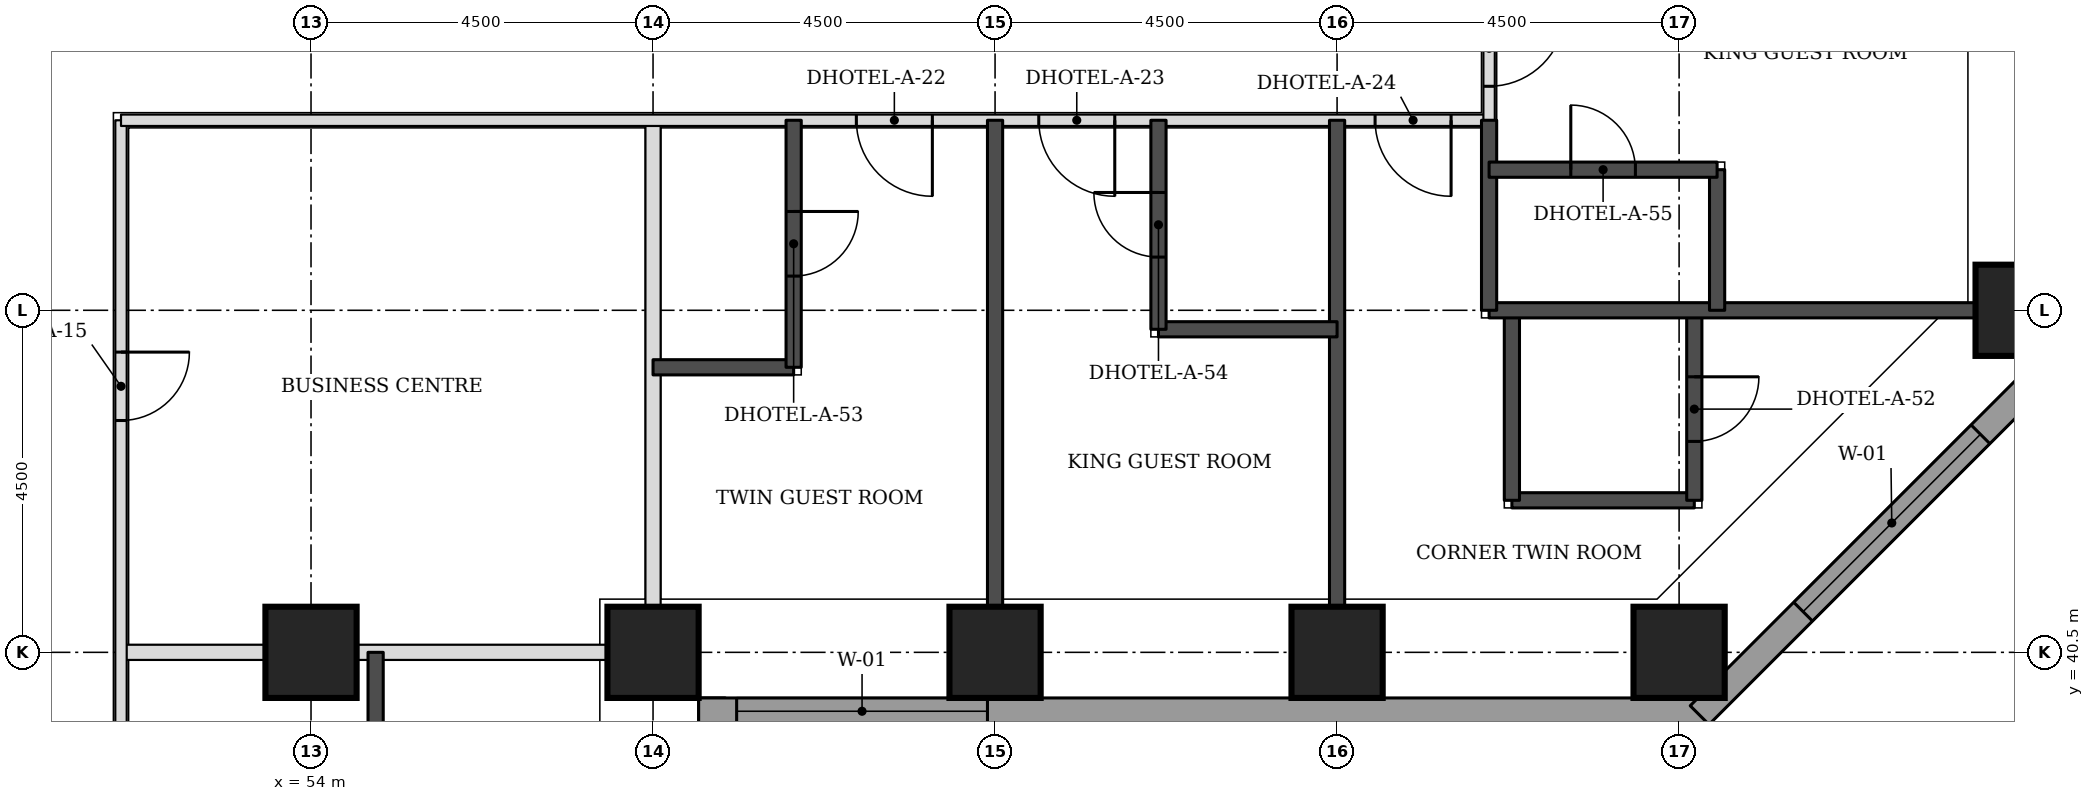
"""IFC4 building model, lengths in metres.
Left out: names, types, materials, properties, quantities, classifications, styles, units other than length and angle.
Written with IfcOpenShell. Run it as: python <this file> out.ifc"""

import sys

from ifc_helpers import new_model, si_unit, direction, frame, frame_2d, origin, origin_2d, place, context, subcontext, project, spatial, rectangle, extrude, element, fill, save


model = new_model("IFC4")
c1 = context("Model", 3, precision=1e-05, world=origin(), true_north=direction((0.0, 1.0)))
c2 = subcontext(c1, "Body", "Model", "MODEL_VIEW")
j1 = project(units=[si_unit("LENGTHUNIT", "METRE"), si_unit("PLANEANGLEUNIT", "RADIAN")], contexts=[c1])
p1 = place(None, origin())
s1 = spatial("IfcSite", under=j1, at=p1, CompositionType="ELEMENT")
p2 = place(p1, origin())
s2 = spatial("IfcBuilding", under=s1, at=p2, CompositionType="ELEMENT")
p3 = place(p2, frame((0.0, 0.0, 49.5)))
s3 = spatial("IfcBuildingStorey", under=s2, at=p3, CompositionType="ELEMENT", Elevation=49.5)
for number, where, z_axis, x_axis in (
    (1, (54.0, 40.5, 0.0), (0.0, 0.0, 1.0), (1.0, 0.0, 0.0)),
    (2, (58.5, 40.5, 0.0), (0.0, 0.0, 1.0), (1.0, 0.0, 0.0)),
    (3, (63.0, 40.5, 0.0), (0.0, 0.0, 1.0), (1.0, 0.0, 0.0)),
    (4, (67.5, 40.5, 0.0), (0.0, 0.0, 1.0), (1.0, 0.0, 0.0)),
    (5, (72.0, 40.5, 0.0), (0.0, 0.0, 1.0), (1.0, 0.0, 0.0)),
    (6, (76.5, 45.0, 0.0), (0.0, 0.0, 1.0), (1.0, 0.0, 0.0)),
):
    element("IfcColumn", number, at=place(p3, frame(where, z_axis=z_axis, x_axis=x_axis)), inside=s3, PredefinedType="COLUMN", context=c2, shape_type="SweptSolid", body=[
        extrude(rectangle(XDim=1.2, YDim=1.2, at=origin_2d()), origin(), (0.0, 0.0, 1.0), 3.3),
    ])
p4 = place(p3, frame((59.275, 22.106, 0.0), z_axis=(0.0, 0.0, 1.0), x_axis=(0.0, 1.0, 0.0)))
e7 = element("IfcWall", 7, at=p4, inside=s3, PredefinedType="STANDARD", context=c2, shape_type="SweptSolid", body=[
    extrude(rectangle(XDim=17.793, YDim=0.35, at=frame_2d((8.897, 0.0))), origin(), (0.0, 0.0, 1.0), 3.055),
])
p5 = place(p4, frame((5.493, 0.0, 0.8)))
e8 = element("IfcOpeningElement", 8, at=p5, cuts=e7, PredefinedType="OPENING", context=c2, shape_type="SweptSolid", body=[
    extrude(rectangle(XDim=3.3, YDim=1.5, at=frame_2d((1.65, 0.75))), frame((0.0, 0.185, 0.0), z_axis=(0.0, -1.0, 0.0), x_axis=(1.0, 0.0, 0.0)), (0.0, 0.0, 1.0), 0.37),
])
p6 = place(p4, frame((13.993, 0.0, 0.8)))
e9 = element("IfcOpeningElement", 9, at=p6, cuts=e7, PredefinedType="OPENING", context=c2, shape_type="SweptSolid", body=[
    extrude(rectangle(XDim=3.3, YDim=1.5, at=frame_2d((1.65, 0.75))), frame((0.0, 0.185, 0.0), z_axis=(0.0, -1.0, 0.0), x_axis=(1.0, 0.0, 0.0)), (0.0, 0.0, 1.0), 0.37),
])
p7 = place(p3, frame((59.1, 39.725, 0.0), z_axis=(0.0, 0.0, 1.0), x_axis=(1.0, 0.0, 0.0)))
e10 = element("IfcWall", 10, at=p7, inside=s3, PredefinedType="STANDARD", context=c2, shape_type="SweptSolid", body=[
    extrude(rectangle(XDim=13.293, YDim=0.35, at=frame_2d((6.647, 0.0))), origin(), (0.0, 0.0, 1.0), 3.055),
])
p8 = place(p7, frame((0.5, 0.0, 0.8)))
e11 = element("IfcOpeningElement", 11, at=p8, cuts=e10, PredefinedType="OPENING", context=c2, shape_type="SweptSolid", body=[
    extrude(rectangle(XDim=3.3, YDim=1.5, at=frame_2d((1.65, 0.75))), frame((0.0, 0.185, 0.0), z_axis=(0.0, -1.0, 0.0), x_axis=(1.0, 0.0, 0.0)), (0.0, 0.0, 1.0), 0.37),
])
p9 = place(p3, frame((72.27, 39.674, 0.0), z_axis=(0.0, 0.0, 1.0), x_axis=(0.707106781187, 0.707106781187, 0.0)))
e12 = element("IfcWall", 12, at=p9, inside=s3, PredefinedType="STANDARD", context=c2, shape_type="SweptSolid", body=[
    extrude(rectangle(XDim=7.151, YDim=0.35, at=frame_2d((3.576, 0.0))), origin(), (0.0, 0.0, 1.0), 3.055),
])
p10 = place(p9, frame((1.926, 0.0, 0.8)))
e13 = element("IfcOpeningElement", 13, at=p10, cuts=e12, PredefinedType="OPENING", context=c2, shape_type="SweptSolid", body=[
    extrude(rectangle(XDim=3.3, YDim=1.5, at=frame_2d((1.65, 0.75))), frame((0.0, 0.185, 0.0), z_axis=(0.0, -1.0, 0.0), x_axis=(1.0, 0.0, 0.0)), (0.0, 0.0, 1.0), 0.37),
])
p11 = place(p3, frame((51.5, 40.5, 0.0), z_axis=(0.0, 0.0, 1.0), x_axis=(1.0, 0.0, 0.0)))
e14 = element("IfcWall", 14, at=p11, inside=s3, PredefinedType="PARTITIONING", context=c2, shape_type="SweptSolid", body=[
    extrude(rectangle(XDim=6.4, YDim=0.2, at=frame_2d((3.2, 0.0))), origin(), (0.0, 0.0, 1.0), 2.33),
])
p12 = place(p3, frame((58.5, 41.1, 0.0), z_axis=(0.0, 0.0, 1.0), x_axis=(0.0, 1.0, 0.0)))
e15 = element("IfcWall", 15, at=p12, inside=s3, PredefinedType="PARTITIONING", context=c2, shape_type="SweptSolid", body=[
    extrude(rectangle(XDim=6.4, YDim=0.2, at=frame_2d((3.2, 0.0))), origin(), (0.0, 0.0, 1.0), 3.08),
])
p13 = place(p3, frame((51.5, 23.65, 0.0), z_axis=(0.0, 0.0, 1.0), x_axis=(0.0, 1.0, 0.0)))
e16 = element("IfcWall", 16, at=p13, inside=s3, PredefinedType="PARTITIONING", context=c2, shape_type="SweptSolid", body=[
    extrude(rectangle(XDim=23.85, YDim=0.15, at=frame_2d((11.925, 0.0))), origin(), (0.0, 0.0, 1.0), 3.08),
])
p14 = place(p13, frame((4.075, 0.0, 0.0)))
e17 = element("IfcOpeningElement", 17, at=p14, cuts=e16, PredefinedType="OPENING", context=c2, shape_type="SweptSolid", body=[
    extrude(rectangle(XDim=1.0, YDim=2.1, at=frame_2d((0.5, 1.05))), frame((0.0, 0.085, 0.0), z_axis=(0.0, -1.0, 0.0), x_axis=(1.0, 0.0, 0.0)), (0.0, 0.0, 1.0), 0.17),
])
p15 = place(p13, frame((10.375, 0.0, 0.0)))
e18 = element("IfcOpeningElement", 18, at=p15, cuts=e16, PredefinedType="OPENING", context=c2, shape_type="SweptSolid", body=[
    extrude(rectangle(XDim=1.0, YDim=2.1, at=frame_2d((0.5, 1.05))), frame((0.0, 0.085, 0.0), z_axis=(0.0, -1.0, 0.0), x_axis=(1.0, 0.0, 0.0)), (0.0, 0.0, 1.0), 0.17),
])
p16 = place(p13, frame((19.9, 0.0, 0.0)))
e19 = element("IfcOpeningElement", 19, at=p16, cuts=e16, PredefinedType="OPENING", context=c2, shape_type="SweptSolid", body=[
    extrude(rectangle(XDim=0.9, YDim=2.1, at=frame_2d((0.45, 1.05))), frame((0.0, 0.085, 0.0), z_axis=(0.0, -1.0, 0.0), x_axis=(1.0, 0.0, 0.0)), (0.0, 0.0, 1.0), 0.17),
])
p17 = place(p3, frame((51.5, 47.5, 0.0), z_axis=(0.0, 0.0, 1.0), x_axis=(1.0, 0.0, 0.0)))
e20 = element("IfcWall", 20, at=p17, inside=s3, PredefinedType="PARTITIONING", context=c2, shape_type="SweptSolid", body=[
    extrude(rectangle(XDim=18.0, YDim=0.15, at=frame_2d((9.0, 0.0))), origin(), (0.0, 0.0, 1.0), 3.08),
])
p18 = place(p17, frame((12.075, 0.0, 0.0)))
e21 = element("IfcOpeningElement", 21, at=p18, cuts=e20, PredefinedType="OPENING", context=c2, shape_type="SweptSolid", body=[
    extrude(rectangle(XDim=1.0, YDim=2.1, at=frame_2d((0.5, 1.05))), frame((0.0, 0.085, 0.0), z_axis=(0.0, -1.0, 0.0), x_axis=(1.0, 0.0, 0.0)), (0.0, 0.0, 1.0), 0.17),
])
p19 = place(p17, frame((9.675, 0.0, 0.0)))
e22 = element("IfcOpeningElement", 22, at=p19, cuts=e20, PredefinedType="OPENING", context=c2, shape_type="SweptSolid", body=[
    extrude(rectangle(XDim=1.0, YDim=2.1, at=frame_2d((0.5, 1.05))), frame((0.0, 0.085, 0.0), z_axis=(0.0, -1.0, 0.0), x_axis=(1.0, 0.0, 0.0)), (0.0, 0.0, 1.0), 0.17),
])
p20 = place(p17, frame((16.5, 0.0, 0.0)))
e23 = element("IfcOpeningElement", 23, at=p20, cuts=e20, PredefinedType="OPENING", context=c2, shape_type="SweptSolid", body=[
    extrude(rectangle(XDim=1.0, YDim=2.1, at=frame_2d((0.5, 1.05))), frame((0.0, 0.085, 0.0), z_axis=(0.0, -1.0, 0.0), x_axis=(1.0, 0.0, 0.0)), (0.0, 0.0, 1.0), 0.17),
])
p21 = place(p3, frame((69.5, 47.5, 0.0), z_axis=(0.0, 0.0, 1.0), x_axis=(0.0, 1.0, 0.0)))
e24 = element("IfcWall", 24, at=p21, inside=s3, PredefinedType="PARTITIONING", context=c2, shape_type="SweptSolid", body=[
    extrude(rectangle(XDim=26.5, YDim=0.15, at=frame_2d((13.25, 0.0))), origin(), (0.0, 0.0, 1.0), 3.08),
])
p22 = place(p21, frame((22.525, 0.0, 0.0)))
e25 = element("IfcOpeningElement", 25, at=p22, cuts=e24, PredefinedType="OPENING", context=c2, shape_type="SweptSolid", body=[
    extrude(rectangle(XDim=1.0, YDim=2.1, at=frame_2d((0.5, 1.05))), frame((0.0, 0.085, 0.0), z_axis=(0.0, -1.0, 0.0), x_axis=(1.0, 0.0, 0.0)), (0.0, 0.0, 1.0), 0.17),
])
p23 = place(p21, frame((16.225, 0.0, 0.0)))
e26 = element("IfcOpeningElement", 26, at=p23, cuts=e24, PredefinedType="OPENING", context=c2, shape_type="SweptSolid", body=[
    extrude(rectangle(XDim=1.0, YDim=2.1, at=frame_2d((0.5, 1.05))), frame((0.0, 0.085, 0.0), z_axis=(0.0, -1.0, 0.0), x_axis=(1.0, 0.0, 0.0)), (0.0, 0.0, 1.0), 0.17),
])
p24 = place(p21, frame((4.25, 0.0, 0.0)))
e27 = element("IfcOpeningElement", 27, at=p24, cuts=e24, PredefinedType="OPENING", context=c2, shape_type="SweptSolid", body=[
    extrude(rectangle(XDim=1.1, YDim=2.1, at=frame_2d((0.55, 1.05))), frame((0.0, 0.085, 0.0), z_axis=(0.0, -1.0, 0.0), x_axis=(1.0, 0.0, 0.0)), (0.0, 0.0, 1.0), 0.17),
])
p25 = place(p21, frame((0.447, 0.0, 0.0)))
e28 = element("IfcOpeningElement", 28, at=p25, cuts=e24, PredefinedType="OPENING", context=c2, shape_type="SweptSolid", body=[
    extrude(rectangle(XDim=1.0, YDim=2.1, at=frame_2d((0.5, 1.05))), frame((0.0, 0.085, 0.0), z_axis=(0.0, -1.0, 0.0), x_axis=(1.0, 0.0, 0.0)), (0.0, 0.0, 1.0), 0.17),
])
p26 = place(p3, frame((54.85, 37.55, 0.0), z_axis=(0.0, 0.0, 1.0), x_axis=(0.0, 1.0, 0.0)))
e29 = element("IfcWall", 29, at=p26, inside=s3, PredefinedType="SOLIDWALL", context=c2, shape_type="SweptSolid", body=[
    extrude(rectangle(XDim=2.95, YDim=0.2, at=frame_2d((1.475, 0.0))), origin(), (0.0, 0.0, 1.0), 3.08),
])
for number, where, z_axis, x_axis in (
    (30, (63.0, 41.1, 0.0), (0.0, 0.0, 1.0), (0.0, 1.0, 0.0)),
    (31, (67.5, 41.1, 0.0), (0.0, 0.0, 1.0), (0.0, 1.0, 0.0)),
):
    element("IfcWall", number, at=place(p3, frame(where, z_axis=z_axis, x_axis=x_axis)), inside=s3, PredefinedType="SOLIDWALL", context=c2, shape_type="SweptSolid", body=[
        extrude(rectangle(XDim=6.4, YDim=0.2, at=frame_2d((3.2, 0.0))), origin(), (0.0, 0.0, 1.0), 3.08),
    ])
p27 = place(p3, frame((69.8, 42.5, 0.0), z_axis=(0.0, 0.0, 1.0), x_axis=(1.0, 0.0, 0.0)))
e32 = element("IfcWall", 32, at=p27, inside=s3, PredefinedType="SOLIDWALL", context=c2, shape_type="SweptSolid", body=[
    extrude(rectangle(XDim=2.4, YDim=0.2, at=frame_2d((1.2, 0.0))), origin(), (0.0, 0.0, 1.0), 3.08),
])
p28 = place(p3, frame((69.8, 42.5, 0.0), z_axis=(0.0, 0.0, 1.0), x_axis=(0.0, 1.0, 0.0)))
e33 = element("IfcWall", 33, at=p28, inside=s3, PredefinedType="SOLIDWALL", context=c2, shape_type="SweptSolid", body=[
    extrude(rectangle(XDim=2.5, YDim=0.2, at=frame_2d((1.25, 0.0))), origin(), (0.0, 0.0, 1.0), 3.08),
])
p29 = place(p3, frame((72.2, 42.5, 0.0), z_axis=(0.0, 0.0, 1.0), x_axis=(0.0, 1.0, 0.0)))
e34 = element("IfcWall", 34, at=p29, inside=s3, PredefinedType="SOLIDWALL", context=c2, shape_type="SweptSolid", body=[
    extrude(rectangle(XDim=2.5, YDim=0.2, at=frame_2d((1.25, 0.0))), origin(), (0.0, 0.0, 1.0), 3.08),
])
p30 = place(p29, frame((0.775, 0.0, 0.0)))
e35 = element("IfcOpeningElement", 35, at=p30, cuts=e34, PredefinedType="OPENING", context=c2, shape_type="SweptSolid", body=[
    extrude(rectangle(XDim=0.85, YDim=2.1, at=frame_2d((0.425, 1.05))), frame((0.0, 0.11, 0.0), z_axis=(0.0, -1.0, 0.0), x_axis=(1.0, 0.0, 0.0)), (0.0, 0.0, 1.0), 0.22),
])
p31 = place(p3, frame((58.5, 44.25, 0.0), z_axis=(0.0, 0.0, 1.0), x_axis=(1.0, 0.0, 0.0)))
e36 = element("IfcWall", 36, at=p31, inside=s3, PredefinedType="SOLIDWALL", context=c2, shape_type="SweptSolid", body=[
    extrude(rectangle(XDim=1.85, YDim=0.2, at=frame_2d((0.925, 0.0))), origin(), (0.0, 0.0, 1.0), 3.08),
])
p32 = place(p3, frame((60.35, 44.25, 0.0), z_axis=(0.0, 0.0, 1.0), x_axis=(0.0, 1.0, 0.0)))
e37 = element("IfcWall", 37, at=p32, inside=s3, PredefinedType="SOLIDWALL", context=c2, shape_type="SweptSolid", body=[
    extrude(rectangle(XDim=3.25, YDim=0.2, at=frame_2d((1.625, 0.0))), origin(), (0.0, 0.0, 1.0), 3.08),
])
p33 = place(p32, frame((1.2, 0.0, 0.0)))
e38 = element("IfcOpeningElement", 38, at=p33, cuts=e37, PredefinedType="OPENING", context=c2, shape_type="SweptSolid", body=[
    extrude(rectangle(XDim=0.85, YDim=2.1, at=frame_2d((0.425, 1.05))), frame((0.0, 0.11, 0.0), z_axis=(0.0, -1.0, 0.0), x_axis=(1.0, 0.0, 0.0)), (0.0, 0.0, 1.0), 0.22),
])
p34 = place(p3, frame((65.15, 44.75, 0.0), z_axis=(0.0, 0.0, 1.0), x_axis=(1.0, 0.0, 0.0)))
e39 = element("IfcWall", 39, at=p34, inside=s3, PredefinedType="SOLIDWALL", context=c2, shape_type="SweptSolid", body=[
    extrude(rectangle(XDim=2.35, YDim=0.2, at=frame_2d((1.175, 0.0))), origin(), (0.0, 0.0, 1.0), 3.08),
])
p35 = place(p3, frame((65.15, 44.75, 0.0), z_axis=(0.0, 0.0, 1.0), x_axis=(0.0, 1.0, 0.0)))
e40 = element("IfcWall", 40, at=p35, inside=s3, PredefinedType="SOLIDWALL", context=c2, shape_type="SweptSolid", body=[
    extrude(rectangle(XDim=2.75, YDim=0.2, at=frame_2d((1.375, 0.0))), origin(), (0.0, 0.0, 1.0), 3.08),
])
p36 = place(p35, frame((0.95, 0.0, 0.0)))
e41 = element("IfcOpeningElement", 41, at=p36, cuts=e40, PredefinedType="OPENING", context=c2, shape_type="SweptSolid", body=[
    extrude(rectangle(XDim=0.85, YDim=2.1, at=frame_2d((0.425, 1.05))), frame((0.0, 0.11, 0.0), z_axis=(0.0, -1.0, 0.0), x_axis=(1.0, 0.0, 0.0)), (0.0, 0.0, 1.0), 0.22),
])
p37 = place(p3, frame((69.5, 45.0, 0.0), z_axis=(0.0, 0.0, 1.0), x_axis=(1.0, 0.0, 0.0)))
e42 = element("IfcWall", 42, at=p37, inside=s3, PredefinedType="SOLIDWALL", context=c2, shape_type="SweptSolid", body=[
    extrude(rectangle(XDim=6.4, YDim=0.2, at=frame_2d((3.2, 0.0))), origin(), (0.0, 0.0, 1.0), 3.08),
])
p38 = place(p3, frame((69.5, 45.0, 0.0), z_axis=(0.0, 0.0, 1.0), x_axis=(0.0, 1.0, 0.0)))
e43 = element("IfcWall", 43, at=p38, inside=s3, PredefinedType="SOLIDWALL", context=c2, shape_type="SweptSolid", body=[
    extrude(rectangle(XDim=2.5, YDim=0.2, at=frame_2d((1.25, 0.0))), origin(), (0.0, 0.0, 1.0), 3.08),
])
p39 = place(p3, frame((72.5, 45.0, 0.0), z_axis=(0.0, 0.0, 1.0), x_axis=(0.0, 1.0, 0.0)))
e44 = element("IfcWall", 44, at=p39, inside=s3, PredefinedType="SOLIDWALL", context=c2, shape_type="SweptSolid", body=[
    extrude(rectangle(XDim=1.85, YDim=0.2, at=frame_2d((0.925, 0.0))), origin(), (0.0, 0.0, 1.0), 3.08),
])
p40 = place(p3, frame((69.5, 46.85, 0.0), z_axis=(0.0, 0.0, 1.0), x_axis=(1.0, 0.0, 0.0)))
e45 = element("IfcWall", 45, at=p40, inside=s3, PredefinedType="SOLIDWALL", context=c2, shape_type="SweptSolid", body=[
    extrude(rectangle(XDim=3.0, YDim=0.2, at=frame_2d((1.5, 0.0))), origin(), (0.0, 0.0, 1.0), 3.08),
])
p41 = place(p40, frame((1.075, 0.0, 0.0)))
e46 = element("IfcOpeningElement", 46, at=p41, cuts=e45, PredefinedType="OPENING", context=c2, shape_type="SweptSolid", body=[
    extrude(rectangle(XDim=0.85, YDim=2.1, at=frame_2d((0.425, 1.05))), frame((0.0, 0.11, 0.0), z_axis=(0.0, -1.0, 0.0), x_axis=(1.0, 0.0, 0.0)), (0.0, 0.0, 1.0), 0.22),
])
p42 = place(p8, origin())
e47 = element("IfcWindow", 47, at=p42, inside=s3, PartitioningType="SINGLE_PANEL", PredefinedType="WINDOW", context=c2, shape_type="SweptSolid", body=[
    extrude(rectangle(XDim=3.3, YDim=1.5, at=frame_2d((1.65, 0.75))), frame((0.0, 0.085, 0.0), z_axis=(0.0, -1.0, 0.0), x_axis=(1.0, 0.0, 0.0)), (0.0, 0.0, 1.0), 0.06),
])
fill(e11, e47)
p43 = place(p10, origin())
e48 = element("IfcWindow", 48, at=p43, inside=s3, PartitioningType="SINGLE_PANEL", PredefinedType="WINDOW", context=c2, shape_type="SweptSolid", body=[
    extrude(rectangle(XDim=3.3, YDim=1.5, at=frame_2d((1.65, 0.75))), frame((0.0, 0.085, 0.0), z_axis=(0.0, -1.0, 0.0), x_axis=(1.0, 0.0, 0.0)), (0.0, 0.0, 1.0), 0.06),
])
fill(e13, e48)
p44 = place(p25, frame((1.0, 0.0, 0.0), z_axis=(0.0, 0.0, 1.0), x_axis=(-1.0, 0.0, 0.0)))
e49 = element("IfcDoor", 49, at=p44, inside=s3, OperationType="SINGLE_SWING_LEFT", PredefinedType="DOOR", context=c2, shape_type="SweptSolid", body=[
    extrude(rectangle(XDim=1.0, YDim=2.1, at=frame_2d((0.5, 1.05))), frame((0.0, 0.025, 0.0), z_axis=(0.0, -1.0, 0.0), x_axis=(1.0, 0.0, 0.0)), (0.0, 0.0, 1.0), 0.05),
])
fill(e28, e49)
p45 = place(p41, origin())
e50 = element("IfcDoor", 50, at=p45, inside=s3, OperationType="SINGLE_SWING_LEFT", PredefinedType="DOOR", context=c2, shape_type="SweptSolid", body=[
    extrude(rectangle(XDim=0.85, YDim=2.1, at=frame_2d((0.425, 1.05))), frame((0.0, 0.025, 0.0), z_axis=(0.0, -1.0, 0.0), x_axis=(1.0, 0.0, 0.0)), (0.0, 0.0, 1.0), 0.05),
])
fill(e46, e50)
p46 = place(p18, frame((1.0, 0.0, 0.0), z_axis=(0.0, 0.0, 1.0), x_axis=(-1.0, 0.0, 0.0)))
e51 = element("IfcDoor", 51, at=p46, inside=s3, OperationType="SINGLE_SWING_LEFT", PredefinedType="DOOR", context=c2, shape_type="SweptSolid", body=[
    extrude(rectangle(XDim=1.0, YDim=2.1, at=frame_2d((0.5, 1.05))), frame((0.0, 0.025, 0.0), z_axis=(0.0, -1.0, 0.0), x_axis=(1.0, 0.0, 0.0)), (0.0, 0.0, 1.0), 0.05),
])
fill(e21, e51)
p47 = place(p36, origin())
e52 = element("IfcDoor", 52, at=p47, inside=s3, OperationType="SINGLE_SWING_RIGHT", PredefinedType="DOOR", context=c2, shape_type="SweptSolid", body=[
    extrude(rectangle(XDim=0.85, YDim=2.1, at=frame_2d((0.425, 1.05))), frame((0.0, 0.025, 0.0), z_axis=(0.0, -1.0, 0.0), x_axis=(1.0, 0.0, 0.0)), (0.0, 0.0, 1.0), 0.05),
])
fill(e41, e52)
p48 = place(p19, frame((1.0, 0.0, 0.0), z_axis=(0.0, 0.0, 1.0), x_axis=(-1.0, 0.0, 0.0)))
e53 = element("IfcDoor", 53, at=p48, inside=s3, OperationType="SINGLE_SWING_LEFT", PredefinedType="DOOR", context=c2, shape_type="SweptSolid", body=[
    extrude(rectangle(XDim=1.0, YDim=2.1, at=frame_2d((0.5, 1.05))), frame((0.0, 0.025, 0.0), z_axis=(0.0, -1.0, 0.0), x_axis=(1.0, 0.0, 0.0)), (0.0, 0.0, 1.0), 0.05),
])
fill(e22, e53)
p49 = place(p33, frame((0.85, 0.0, 0.0), z_axis=(0.0, 0.0, 1.0), x_axis=(-1.0, 0.0, 0.0)))
e54 = element("IfcDoor", 54, at=p49, inside=s3, OperationType="SINGLE_SWING_LEFT", PredefinedType="DOOR", context=c2, shape_type="SweptSolid", body=[
    extrude(rectangle(XDim=0.85, YDim=2.1, at=frame_2d((0.425, 1.05))), frame((0.0, 0.025, 0.0), z_axis=(0.0, -1.0, 0.0), x_axis=(1.0, 0.0, 0.0)), (0.0, 0.0, 1.0), 0.05),
])
fill(e38, e54)
p50 = place(p20, frame((1.0, 0.0, 0.0), z_axis=(0.0, 0.0, 1.0), x_axis=(-1.0, 0.0, 0.0)))
e55 = element("IfcDoor", 55, at=p50, inside=s3, OperationType="SINGLE_SWING_LEFT", PredefinedType="DOOR", context=c2, shape_type="SweptSolid", body=[
    extrude(rectangle(XDim=1.0, YDim=2.1, at=frame_2d((0.5, 1.05))), frame((0.0, 0.025, 0.0), z_axis=(0.0, -1.0, 0.0), x_axis=(1.0, 0.0, 0.0)), (0.0, 0.0, 1.0), 0.05),
])
fill(e23, e55)
p51 = place(p30, frame((0.85, 0.0, 0.0), z_axis=(0.0, 0.0, 1.0), x_axis=(-1.0, 0.0, 0.0)))
e56 = element("IfcDoor", 56, at=p51, inside=s3, OperationType="SINGLE_SWING_LEFT", PredefinedType="DOOR", context=c2, shape_type="SweptSolid", body=[
    extrude(rectangle(XDim=0.85, YDim=2.1, at=frame_2d((0.425, 1.05))), frame((0.0, 0.025, 0.0), z_axis=(0.0, -1.0, 0.0), x_axis=(1.0, 0.0, 0.0)), (0.0, 0.0, 1.0), 0.05),
])
fill(e35, e56)
p52 = place(p16, frame((0.9, 0.0, 0.0), z_axis=(0.0, 0.0, 1.0), x_axis=(-1.0, 0.0, 0.0)))
e57 = element("IfcDoor", 57, at=p52, inside=s3, OperationType="SINGLE_SWING_LEFT", PredefinedType="DOOR", context=c2, shape_type="SweptSolid", body=[
    extrude(rectangle(XDim=0.9, YDim=2.1, at=frame_2d((0.45, 1.05))), frame((0.0, 0.025, 0.0), z_axis=(0.0, -1.0, 0.0), x_axis=(1.0, 0.0, 0.0)), (0.0, 0.0, 1.0), 0.05),
])
fill(e19, e57)
save(model, sys.argv[1])
